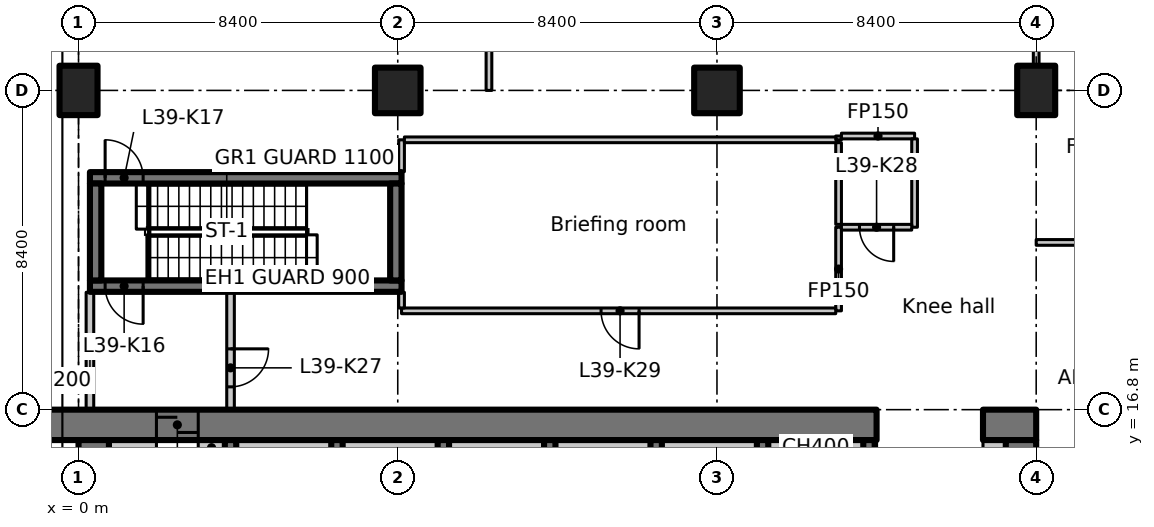
"""IFC4 building model, lengths in metres.
Left out: names, types, materials, properties, quantities, classifications, styles, units other than length and angle.
Written with IfcOpenShell. Run it as: python <this file> out.ifc"""

import sys

from ifc_helpers import new_model, si_unit, direction, frame, frame_2d, origin, origin_2d, place, context, subcontext, project, spatial, polyline, rectangle, outline, extrude, element, fill, save


model = new_model("IFC4")
c1 = context("Model", 3, precision=1e-05, world=origin(), true_north=direction((0.0, 1.0)))
c2 = subcontext(c1, "Body", "Model", "MODEL_VIEW")
j1 = project(units=[si_unit("LENGTHUNIT", "METRE"), si_unit("PLANEANGLEUNIT", "RADIAN")], contexts=[c1])
p1 = place(None, origin())
s1 = spatial("IfcSite", under=j1, at=p1, CompositionType="ELEMENT")
p2 = place(p1, origin())
s2 = spatial("IfcBuilding", under=s1, at=p2, CompositionType="ELEMENT")
p3 = place(p2, frame((0.0, 0.0, 156.5)))
s3 = spatial("IfcBuildingStorey", under=s2, at=p3, CompositionType="ELEMENT", Elevation=156.5)
p4 = place(p3, frame((0.0, 25.2, 0.0), z_axis=(0.0, 0.0, 1.0), x_axis=(1.0, 0.0, 0.0)))
e1 = element("IfcColumn", 1, at=p4, inside=s3, PredefinedType="COLUMN", context=c2, shape_type="SweptSolid", body=[
    extrude(rectangle(XDim=1.0, YDim=1.3, at=origin_2d()), origin(), (0.0, 0.0, 1.0), 5.2),
])
for number, where, z_axis, x_axis in (
    (2, (8.4, 25.2, 0.0), (0.0, 0.0, 1.0), (1.0, 0.0, 0.0)),
    (3, (16.8, 25.2, 0.0), (0.0, 0.0, 1.0), (1.0, 0.0, 0.0)),
):
    element("IfcColumn", number, at=place(p3, frame(where, z_axis=z_axis, x_axis=x_axis)), inside=s3, PredefinedType="COLUMN", context=c2, shape_type="SweptSolid", body=[
        extrude(rectangle(XDim=1.2, YDim=1.2, at=origin_2d()), origin(), (0.0, 0.0, 1.0), 5.2),
    ])
p5 = place(p3, frame((25.2, 25.2, 0.0), z_axis=(0.0, 0.0, 1.0), x_axis=(1.0, 0.0, 0.0)))
e4 = element("IfcColumn", 4, at=p5, inside=s3, PredefinedType="COLUMN", context=c2, shape_type="SweptSolid", body=[
    extrude(rectangle(XDim=1.0, YDim=1.3, at=origin_2d()), origin(), (0.0, 0.0, 1.0), 5.2),
])
p6 = place(p3, frame((-1.1, 16.4, 0.0), z_axis=(0.0, 0.0, 1.0), x_axis=(1.0, 0.0, 0.0)))
e5 = element("IfcWall", 5, at=p6, inside=s3, PredefinedType="SHEAR", context=c2, shape_type="SweptSolid", body=[
    extrude(rectangle(XDim=22.1, YDim=0.8, at=frame_2d((11.05, 0.0))), origin(), (0.0, 0.0, 1.0), 5.2),
])
p7 = place(p6, frame((3.15, 0.0, 0.0)))
e6 = element("IfcOpeningElement", 6, at=p7, cuts=e5, PredefinedType="OPENING", context=c2, shape_type="SweptSolid", body=[
    extrude(rectangle(XDim=1.1, YDim=2.3, at=frame_2d((0.55, 1.15))), frame((0.0, 0.41, 0.0), z_axis=(0.0, -1.0, 0.0), x_axis=(1.0, 0.0, 0.0)), (0.0, 0.0, 1.0), 0.82),
])
p8 = place(p3, frame((23.8, 16.4, 0.0), z_axis=(0.0, 0.0, 1.0), x_axis=(1.0, 0.0, 0.0)))
e7 = element("IfcWall", 7, at=p8, inside=s3, PredefinedType="SHEAR", context=c2, shape_type="SweptSolid", body=[
    extrude(rectangle(XDim=1.4, YDim=0.8, at=frame_2d((0.7, 0.0))), origin(), (0.0, 0.0, 1.0), 5.2),
])
p9 = place(p3, frame((0.4, 7.136, 0.0), z_axis=(0.0, 0.0, 1.0), x_axis=(0.0, 1.0, 0.0)))
e8 = element("IfcWall", 8, at=p9, inside=s3, PredefinedType="SHEAR", context=c2, shape_type="SweptSolid", body=[
    extrude(rectangle(XDim=8.864, YDim=0.8, at=frame_2d((4.432, 0.0))), origin(), (0.0, 0.0, 1.0), 5.2),
])
p10 = place(p3, frame((24.8, 12.6, 0.0), z_axis=(0.0, 0.0, 1.0), x_axis=(0.0, 1.0, 0.0)))
e9 = element("IfcWall", 9, at=p10, inside=s3, PredefinedType="SHEAR", context=c2, shape_type="SweptSolid", body=[
    extrude(rectangle(XDim=3.4, YDim=0.8, at=frame_2d((1.7, 0.0))), origin(), (0.0, 0.0, 1.0), 5.2),
])
p11 = place(p3, frame((0.8, 15.8, 0.0), z_axis=(0.0, 0.0, 1.0), x_axis=(1.0, 0.0, 0.0)))
e10 = element("IfcWall", 10, at=p11, inside=s3, PredefinedType="PARTITIONING", context=c2, shape_type="SweptSolid", body=[
    extrude(rectangle(XDim=1.25, YDim=0.4, at=frame_2d((0.625, 0.0))), origin(), (0.0, 0.0, 1.0), 5.2),
])
p12 = place(p3, frame((23.8, 15.8, 0.0), z_axis=(0.0, 0.0, 1.0), x_axis=(1.0, 0.0, 0.0)))
e11 = element("IfcWall", 11, at=p12, inside=s3, PredefinedType="PARTITIONING", context=c2, shape_type="SweptSolid", body=[
    extrude(rectangle(XDim=0.6, YDim=0.4, at=frame_2d((0.3, 0.0))), origin(), (0.0, 0.0, 1.0), 5.2),
])
for number, where, z_axis, x_axis in (
    (12, (4.0, 12.95, 0.0), (0.0, 0.0, 1.0), (0.0, 1.0, 0.0)),
    (13, (6.8, 12.95, 0.0), (0.0, 0.0, 1.0), (0.0, 1.0, 0.0)),
    (14, (9.6, 12.95, 0.0), (0.0, 0.0, 1.0), (0.0, 1.0, 0.0)),
    (15, (12.4, 12.95, 0.0), (0.0, 0.0, 1.0), (0.0, 1.0, 0.0)),
    (16, (15.2, 12.95, 0.0), (0.0, 0.0, 1.0), (0.0, 1.0, 0.0)),
    (17, (18.0, 12.95, 0.0), (0.0, 0.0, 1.0), (0.0, 1.0, 0.0)),
    (18, (20.8, 12.95, 0.0), (0.0, 0.0, 1.0), (0.0, 1.0, 0.0)),
):
    element("IfcWall", number, at=place(p3, frame(where, z_axis=z_axis, x_axis=x_axis)), inside=s3, PredefinedType="SHEAR", context=c2, shape_type="SweptSolid", body=[
        extrude(rectangle(XDim=3.05, YDim=0.3, at=frame_2d((1.525, 0.0))), origin(), (0.0, 0.0, 1.0), 5.2),
    ])
p13 = place(p3, frame((8.5, 20.05, 0.0), z_axis=(0.0, 0.0, 1.0), x_axis=(-1.0, 0.0, 0.0)))
e19 = element("IfcWall", 19, at=p13, inside=s3, PredefinedType="SHEAR", context=c2, shape_type="SweptSolid", body=[
    extrude(rectangle(XDim=8.2, YDim=0.3, at=frame_2d((4.1, 0.0))), origin(), (0.0, 0.0, 1.0), 5.2),
])
p14 = place(p13, frame((6.8, 0.0, 0.0)))
e20 = element("IfcOpeningElement", 20, at=p14, cuts=e19, PredefinedType="OPENING", context=c2, shape_type="SweptSolid", body=[
    extrude(rectangle(XDim=1.0, YDim=2.1, at=frame_2d((0.5, 1.05))), frame((0.0, 0.16, 0.0), z_axis=(0.0, -1.0, 0.0), x_axis=(1.0, 0.0, 0.0)), (0.0, 0.0, 1.0), 0.32),
])
p15 = place(p3, frame((0.3, 22.9, 0.0), z_axis=(0.0, 0.0, 1.0), x_axis=(1.0, 0.0, 0.0)))
e21 = element("IfcWall", 21, at=p15, inside=s3, PredefinedType="SHEAR", context=c2, shape_type="SweptSolid", body=[
    extrude(rectangle(XDim=8.2, YDim=0.3, at=frame_2d((4.1, 0.0))), origin(), (0.0, 0.0, 1.0), 5.2),
])
p16 = place(p15, frame((0.4, 0.0, 0.0)))
e22 = element("IfcOpeningElement", 22, at=p16, cuts=e21, PredefinedType="OPENING", context=c2, shape_type="SweptSolid", body=[
    extrude(rectangle(XDim=1.0, YDim=2.1, at=frame_2d((0.5, 1.05))), frame((0.0, 0.16, 0.0), z_axis=(0.0, -1.0, 0.0), x_axis=(1.0, 0.0, 0.0)), (0.0, 0.0, 1.0), 0.32),
])
for number, where, z_axis, x_axis in (
    (23, (0.45, 20.2, 0.0), (0.0, 0.0, 1.0), (0.0, 1.0, 0.0)),
    (24, (8.35, 20.2, 0.0), (0.0, 0.0, 1.0), (0.0, 1.0, 0.0)),
):
    element("IfcWall", number, at=place(p3, frame(where, z_axis=z_axis, x_axis=x_axis)), inside=s3, PredefinedType="SHEAR", context=c2, shape_type="SweptSolid", body=[
        extrude(rectangle(XDim=2.55, YDim=0.3, at=frame_2d((1.275, 0.0))), origin(), (0.0, 0.0, 1.0), 5.2),
    ])
p17 = place(p3, frame((0.3, 16.812, 0.0), z_axis=(0.0, 0.0, 1.0), x_axis=(0.0, 1.0, 0.0)))
e25 = element("IfcWall", 25, at=p17, inside=s3, PredefinedType="PARTITIONING", context=c2, shape_type="SweptSolid", body=[
    extrude(rectangle(XDim=3.076, YDim=0.2, at=frame_2d((1.538, 0.0))), origin(), (0.0, 0.0, 1.0), 4.83),
])
p18 = place(p3, frame((4.0, 19.888, 0.0), z_axis=(0.0, 0.0, 1.0), x_axis=(0.0, -1.0, 0.0)))
e26 = element("IfcWall", 26, at=p18, inside=s3, PredefinedType="PARTITIONING", context=c2, shape_type="SweptSolid", body=[
    extrude(rectangle(XDim=3.076, YDim=0.2, at=frame_2d((1.538, 0.0))), origin(), (0.0, 0.0, 1.0), 5.2),
])
p19 = place(p18, frame((1.488, 0.0, 0.0)))
e27 = element("IfcOpeningElement", 27, at=p19, cuts=e26, PredefinedType="OPENING", context=c2, shape_type="SweptSolid", body=[
    extrude(rectangle(XDim=1.0, YDim=2.1, at=frame_2d((0.5, 1.05))), frame((0.0, 0.11, 0.0), z_axis=(0.0, -1.0, 0.0), x_axis=(1.0, 0.0, 0.0)), (0.0, 0.0, 1.0), 0.22),
])
p20 = place(p3, frame((20.0, 21.6, 0.0), z_axis=(0.0, 0.0, 1.0), x_axis=(0.0, -1.0, 0.0)))
e28 = element("IfcWall", 28, at=p20, inside=s3, PredefinedType="PARTITIONING", context=c2, shape_type="SweptSolid", body=[
    extrude(rectangle(XDim=2.2, YDim=0.15, at=frame_2d((1.1, 0.0))), origin(), (0.0, 0.0, 1.0), 5.2),
])
p21 = place(p3, frame((19.925, 19.4, 0.0), z_axis=(0.0, 0.0, 1.0), x_axis=(-1.0, 0.0, 0.0)))
e29 = element("IfcWall", 29, at=p21, inside=s3, PredefinedType="PARTITIONING", context=c2, shape_type="SweptSolid", body=[
    extrude(rectangle(XDim=11.425, YDim=0.15, at=frame_2d((5.712, 0.0))), origin(), (0.0, 0.0, 1.0), 5.2),
])
p22 = place(p21, frame((5.175, 0.0, 0.0)))
e30 = element("IfcOpeningElement", 30, at=p22, cuts=e29, PredefinedType="OPENING", context=c2, shape_type="SweptSolid", body=[
    extrude(rectangle(XDim=1.0, YDim=2.1, at=frame_2d((0.5, 1.05))), frame((0.0, 0.085, 0.0), z_axis=(0.0, -1.0, 0.0), x_axis=(1.0, 0.0, 0.0)), (0.0, 0.0, 1.0), 0.17),
])
p23 = place(p3, frame((8.5, 19.475, 0.0), z_axis=(0.0, 0.0, 1.0), x_axis=(0.0, 1.0, 0.0)))
e31 = element("IfcWall", 31, at=p23, inside=s3, PredefinedType="PARTITIONING", context=c2, shape_type="SweptSolid", body=[
    extrude(rectangle(XDim=0.413, YDim=0.15, at=frame_2d((0.207, 0.0))), origin(), (0.0, 0.0, 1.0), 5.2),
])
p24 = place(p3, frame((8.5, 23.062, 0.0), z_axis=(0.0, 0.0, 1.0), x_axis=(0.0, 1.0, 0.0)))
e32 = element("IfcWall", 32, at=p24, inside=s3, PredefinedType="PARTITIONING", context=c2, shape_type="SweptSolid", body=[
    extrude(rectangle(XDim=0.838, YDim=0.15, at=frame_2d((0.419, 0.0))), origin(), (0.0, 0.0, 1.0), 5.2),
])
p25 = place(p3, frame((8.575, 23.9, 0.0), z_axis=(0.0, 0.0, 1.0), x_axis=(1.0, 0.0, 0.0)))
e33 = element("IfcWall", 33, at=p25, inside=s3, PredefinedType="PARTITIONING", context=c2, shape_type="SweptSolid", body=[
    extrude(rectangle(XDim=11.425, YDim=0.15, at=frame_2d((5.712, 0.0))), origin(), (0.0, 0.0, 1.0), 5.2),
])
p26 = place(p3, frame((20.0, 23.9, 0.0), z_axis=(0.0, 0.0, 1.0), x_axis=(0.0, 1.0, 0.0)))
e34 = element("IfcWall", 34, at=p26, inside=s3, PredefinedType="PARTITIONING", context=c2, shape_type="SweptSolid", body=[
    extrude(rectangle(XDim=0.1, YDim=0.15, at=frame_2d((0.05, 0.0))), origin(), (0.0, 0.0, 1.0), 5.2),
])
p27 = place(p3, frame((20.075, 24.0, 0.0), z_axis=(0.0, 0.0, 1.0), x_axis=(1.0, 0.0, 0.0)))
e35 = element("IfcWall", 35, at=p27, inside=s3, PredefinedType="PARTITIONING", context=c2, shape_type="SweptSolid", body=[
    extrude(rectangle(XDim=1.925, YDim=0.15, at=frame_2d((0.962, 0.0))), origin(), (0.0, 0.0, 1.0), 5.2),
])
p28 = place(p3, frame((22.0, 23.925, 0.0), z_axis=(0.0, 0.0, 1.0), x_axis=(0.0, -1.0, 0.0)))
e36 = element("IfcWall", 36, at=p28, inside=s3, PredefinedType="PARTITIONING", context=c2, shape_type="SweptSolid", body=[
    extrude(rectangle(XDim=2.325, YDim=0.15, at=frame_2d((1.163, 0.0))), origin(), (0.0, 0.0, 1.0), 5.2),
])
p29 = place(p3, frame((21.925, 21.6, 0.0), z_axis=(0.0, 0.0, 1.0), x_axis=(-1.0, 0.0, 0.0)))
e37 = element("IfcWall", 37, at=p29, inside=s3, PredefinedType="PARTITIONING", context=c2, shape_type="SweptSolid", body=[
    extrude(rectangle(XDim=1.85, YDim=0.15, at=frame_2d((0.925, 0.0))), origin(), (0.0, 0.0, 1.0), 5.2),
])
p30 = place(p29, frame((0.475, 0.0, 0.0)))
e38 = element("IfcOpeningElement", 38, at=p30, cuts=e37, PredefinedType="OPENING", context=c2, shape_type="SweptSolid", body=[
    extrude(rectangle(XDim=0.9, YDim=2.1, at=frame_2d((0.45, 1.05))), frame((0.0, 0.085, 0.0), z_axis=(0.0, -1.0, 0.0), x_axis=(1.0, 0.0, 0.0)), (0.0, 0.0, 1.0), 0.17),
])
p31 = place(p3, frame((20.0, 21.675, 0.0), z_axis=(0.0, 0.0, 1.0), x_axis=(0.0, 1.0, 0.0)))
e39 = element("IfcWall", 39, at=p31, inside=s3, PredefinedType="PARTITIONING", context=c2, shape_type="SweptSolid", body=[
    extrude(rectangle(XDim=2.15, YDim=0.15, at=frame_2d((1.075, 0.0))), origin(), (0.0, 0.0, 1.0), 5.2),
])
p32 = place(p3, frame((3.15, 15.8, 0.0), z_axis=(0.0, 0.0, 1.0), x_axis=(1.0, 0.0, 0.0)))
e40 = element("IfcWall", 40, at=p32, inside=s3, PredefinedType="PARTITIONING", context=c2, shape_type="SweptSolid", body=[
    extrude(rectangle(XDim=0.7, YDim=0.4, at=frame_2d((0.35, 0.0))), origin(), (0.0, 0.0, 1.0), 5.2),
])
for number, where, z_axis, x_axis in (
    (41, (4.15, 15.8, 0.0), (0.0, 0.0, 1.0), (1.0, 0.0, 0.0)),
    (42, (6.95, 15.8, 0.0), (0.0, 0.0, 1.0), (1.0, 0.0, 0.0)),
    (43, (9.75, 15.8, 0.0), (0.0, 0.0, 1.0), (1.0, 0.0, 0.0)),
    (44, (12.55, 15.8, 0.0), (0.0, 0.0, 1.0), (1.0, 0.0, 0.0)),
    (45, (15.35, 15.8, 0.0), (0.0, 0.0, 1.0), (1.0, 0.0, 0.0)),
    (46, (18.15, 15.8, 0.0), (0.0, 0.0, 1.0), (1.0, 0.0, 0.0)),
):
    element("IfcWall", number, at=place(p3, frame(where, z_axis=z_axis, x_axis=x_axis)), inside=s3, PredefinedType="PARTITIONING", context=c2, shape_type="SweptSolid", body=[
        extrude(rectangle(XDim=2.5, YDim=0.4, at=frame_2d((1.25, 0.0))), origin(), (0.0, 0.0, 1.0), 5.2),
    ])
p33 = place(p3, frame((20.95, 15.8, 0.0), z_axis=(0.0, 0.0, 1.0), x_axis=(1.0, 0.0, 0.0)))
e47 = element("IfcWall", 47, at=p33, inside=s3, PredefinedType="PARTITIONING", context=c2, shape_type="SweptSolid", body=[
    extrude(rectangle(XDim=0.05, YDim=0.4, at=frame_2d((0.025, 0.0))), origin(), (0.0, 0.0, 1.0), 5.2),
])
p34 = place(p3, frame((25.2, 21.2, 0.0), z_axis=(0.0, 0.0, 1.0), x_axis=(1.0, 0.0, 0.0)))
e48 = element("IfcWall", 48, at=p34, inside=s3, PredefinedType="PARTITIONING", context=c2, shape_type="SweptSolid", body=[
    extrude(rectangle(XDim=4.2, YDim=0.15, at=frame_2d((2.1, 0.0))), origin(), (0.0, 0.0, 1.0), 5.18),
])
p35 = place(p3, frame((25.2, 31.0, 0.0), z_axis=(0.0, 0.0, 1.0), x_axis=(0.0, -1.0, 0.0)))
e49 = element("IfcWall", 49, at=p35, inside=s3, PredefinedType="PARTITIONING", context=c2, shape_type="SweptSolid", body=[
    extrude(outline(polyline([(0.0, 0.0), (5.13, 0.0), (5.13, 4.83), (0.0, 4.83), (0.0, 0.0)])), frame((0.0, 0.075, 0.0), z_axis=(0.0, -1.0, 0.0), x_axis=(1.0, 0.0, 0.0)), (0.0, 0.0, 1.0), 0.15),
])
p36 = place(p35, frame((1.93, 0.0, 0.0)))
e50 = element("IfcOpeningElement", 50, at=p36, cuts=e49, PredefinedType="OPENING", context=c2, shape_type="SweptSolid", body=[
    extrude(rectangle(XDim=1.1, YDim=2.1, at=frame_2d((0.55, 1.05))), frame((0.0, 0.085, 0.0), z_axis=(0.0, -1.0, 0.0), x_axis=(1.0, 0.0, 0.0)), (0.0, 0.0, 1.0), 0.17),
])
p37 = place(p3, frame((10.8, 25.2, 0.0), z_axis=(0.0, 0.0, 1.0), x_axis=(0.0, 1.0, 0.0)))
e51 = element("IfcWall", 51, at=p37, inside=s3, PredefinedType="PARTITIONING", context=c2, shape_type="SweptSolid", body=[
    extrude(rectangle(XDim=4.2, YDim=0.15, at=frame_2d((2.1, 0.0))), origin(), (0.0, 0.0, 1.0), 5.18),
])
p38 = place(p37, frame((1.2, 0.0, 0.0)))
e52 = element("IfcOpeningElement", 52, at=p38, cuts=e51, PredefinedType="OPENING", context=c2, shape_type="SweptSolid", body=[
    extrude(rectangle(XDim=2.0, YDim=2.4, at=frame_2d((1.0, 1.2))), frame((0.0, 0.085, 0.0), z_axis=(0.0, -1.0, 0.0), x_axis=(1.0, 0.0, 0.0)), (0.0, 0.0, 1.0), 0.17),
])
p39 = place(p7, origin())
e53 = element("IfcDoor", 53, at=p39, inside=s3, OperationType="SLIDING_TO_LEFT", PredefinedType="DOOR", context=c2, shape_type="SweptSolid", body=[
    extrude(rectangle(XDim=1.1, YDim=2.3, at=frame_2d((0.55, 1.15))), frame((0.0, 0.025, 0.0), z_axis=(0.0, -1.0, 0.0), x_axis=(1.0, 0.0, 0.0)), (0.0, 0.0, 1.0), 0.05),
])
fill(e6, e53)
p40 = place(p14, origin())
e54 = element("IfcDoor", 54, at=p40, inside=s3, OperationType="SINGLE_SWING_RIGHT", PredefinedType="DOOR", context=c2, shape_type="SweptSolid", body=[
    extrude(rectangle(XDim=1.0, YDim=2.1, at=frame_2d((0.5, 1.05))), frame((0.0, 0.025, 0.0), z_axis=(0.0, -1.0, 0.0), x_axis=(1.0, 0.0, 0.0)), (0.0, 0.0, 1.0), 0.05),
])
fill(e20, e54)
p41 = place(p16, origin())
e55 = element("IfcDoor", 55, at=p41, inside=s3, OperationType="SINGLE_SWING_LEFT", PredefinedType="DOOR", context=c2, shape_type="SweptSolid", body=[
    extrude(rectangle(XDim=1.0, YDim=2.1, at=frame_2d((0.5, 1.05))), frame((0.0, 0.025, 0.0), z_axis=(0.0, -1.0, 0.0), x_axis=(1.0, 0.0, 0.0)), (0.0, 0.0, 1.0), 0.05),
])
fill(e22, e55)
p42 = place(p19, origin())
e56 = element("IfcDoor", 56, at=p42, inside=s3, OperationType="SINGLE_SWING_LEFT", PredefinedType="DOOR", context=c2, shape_type="SweptSolid", body=[
    extrude(rectangle(XDim=1.0, YDim=2.1, at=frame_2d((0.5, 1.05))), frame((0.0, 0.025, 0.0), z_axis=(0.0, -1.0, 0.0), x_axis=(1.0, 0.0, 0.0)), (0.0, 0.0, 1.0), 0.05),
])
fill(e27, e56)
p43 = place(p30, origin())
e57 = element("IfcDoor", 57, at=p43, inside=s3, OperationType="SINGLE_SWING_RIGHT", PredefinedType="DOOR", context=c2, shape_type="SweptSolid", body=[
    extrude(rectangle(XDim=0.9, YDim=2.1, at=frame_2d((0.45, 1.05))), frame((0.0, 0.025, 0.0), z_axis=(0.0, -1.0, 0.0), x_axis=(1.0, 0.0, 0.0)), (0.0, 0.0, 1.0), 0.05),
])
fill(e38, e57)
p44 = place(p22, origin())
e58 = element("IfcDoor", 58, at=p44, inside=s3, OperationType="SINGLE_SWING_LEFT", PredefinedType="DOOR", context=c2, shape_type="SweptSolid", body=[
    extrude(rectangle(XDim=1.0, YDim=2.1, at=frame_2d((0.5, 1.05))), frame((0.0, 0.025, 0.0), z_axis=(0.0, -1.0, 0.0), x_axis=(1.0, 0.0, 0.0)), (0.0, 0.0, 1.0), 0.05),
])
fill(e30, e58)
save(model, sys.argv[1])
